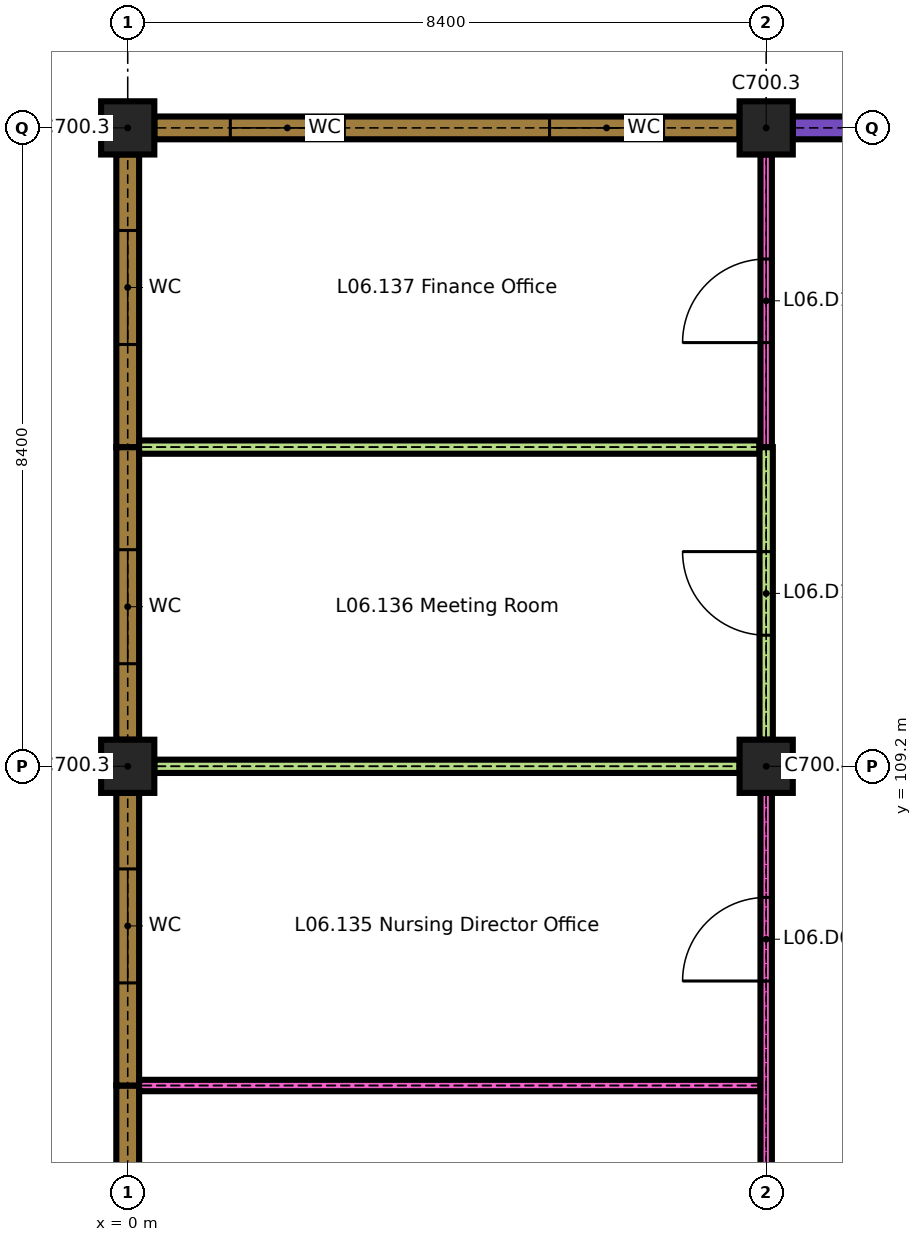
"""IFC4 building model, lengths in metres.
Left out: names, types, materials, properties, quantities, classifications, styles, units other than length and angle.
Written with IfcOpenShell. Run it as: python <this file> out.ifc"""

import sys

from ifc_helpers import new_model, si_unit, direction, frame, frame_2d, origin, origin_2d, place, context, subcontext, project, spatial, rectangle, extrude, element, fill, save


model = new_model("IFC4")
c1 = context("Model", 3, precision=1e-05, world=origin(), true_north=direction((0.0, 1.0)))
c2 = subcontext(c1, "Body", "Model", "MODEL_VIEW")
j1 = project(units=[si_unit("LENGTHUNIT", "METRE"), si_unit("PLANEANGLEUNIT", "RADIAN")], contexts=[c1])
p1 = place(None, origin())
s1 = spatial("IfcSite", under=j1, at=p1, CompositionType="ELEMENT")
p2 = place(p1, origin())
s2 = spatial("IfcBuilding", under=s1, at=p2, CompositionType="ELEMENT")
p3 = place(p2, frame((0.0, 0.0, 26.1)))
s3 = spatial("IfcBuildingStorey", under=s2, at=p3, CompositionType="ELEMENT", Elevation=26.1)
p4 = place(p3, frame((0.0, 109.2, 0.0), z_axis=(0.0, 0.0, 1.0), x_axis=(1.0, 0.0, 0.0)))
e1 = element("IfcColumn", 1, at=p4, inside=s3, PredefinedType="COLUMN", context=c2, shape_type="SweptSolid", body=[
    extrude(rectangle(XDim=0.7, YDim=0.7, at=origin_2d()), origin(), (0.0, 0.0, 1.0), 3.2),
])
p5 = place(p3, frame((8.4, 109.2, 0.0), z_axis=(0.0, 0.0, 1.0), x_axis=(1.0, 0.0, 0.0)))
e2 = element("IfcColumn", 2, at=p5, inside=s3, PredefinedType="COLUMN", context=c2, shape_type="SweptSolid", body=[
    extrude(rectangle(XDim=0.7, YDim=0.7, at=origin_2d()), origin(), (0.0, 0.0, 1.0), 3.3),
])
for number, where, z_axis, x_axis in (
    (3, (0.0, 117.6, 0.0), (0.0, 0.0, 1.0), (1.0, 0.0, 0.0)),
    (4, (8.4, 117.6, 0.0), (0.0, 0.0, 1.0), (1.0, 0.0, 0.0)),
):
    element("IfcColumn", number, at=place(p3, frame(where, z_axis=z_axis, x_axis=x_axis)), inside=s3, PredefinedType="COLUMN", context=c2, shape_type="SweptSolid", body=[
        extrude(rectangle(XDim=0.7, YDim=0.7, at=origin_2d()), origin(), (0.0, 0.0, 1.0), 3.2),
    ])
p6 = place(p3, frame((0.35, 117.6, 0.0), z_axis=(0.0, 0.0, 1.0), x_axis=(1.0, 0.0, 0.0)))
e5 = element("IfcWall", 5, at=p6, inside=s3, PredefinedType="SOLIDWALL", context=c2, shape_type="SweptSolid", body=[
    extrude(rectangle(XDim=7.7, YDim=0.3, at=frame_2d((3.85, 0.0))), origin(), (0.0, 0.0, 1.0), 2.9),
])
p7 = place(p6, frame((1.0, 0.0, 0.9)))
e6 = element("IfcOpeningElement", 6, at=p7, cuts=e5, PredefinedType="OPENING", context=c2, shape_type="SweptSolid", body=[
    extrude(rectangle(XDim=1.5, YDim=1.5, at=frame_2d((0.75, 0.75))), frame((0.0, 0.16, 0.0), z_axis=(0.0, -1.0, 0.0), x_axis=(1.0, 0.0, 0.0)), (0.0, 0.0, 1.0), 0.32),
])
p8 = place(p6, frame((5.2, 0.0, 0.9)))
e7 = element("IfcOpeningElement", 7, at=p8, cuts=e5, PredefinedType="OPENING", context=c2, shape_type="SweptSolid", body=[
    extrude(rectangle(XDim=1.5, YDim=1.5, at=frame_2d((0.75, 0.75))), frame((0.0, 0.16, 0.0), z_axis=(0.0, -1.0, 0.0), x_axis=(1.0, 0.0, 0.0)), (0.0, 0.0, 1.0), 0.32),
])
p9 = place(p3, frame((8.75, 117.6, 0.0), z_axis=(0.0, 0.0, 1.0), x_axis=(1.0, 0.0, 0.0)))
e8 = element("IfcWall", 8, at=p9, inside=s3, PredefinedType="SOLIDWALL", context=c2, shape_type="SweptSolid", body=[
    extrude(rectangle(XDim=2.65, YDim=0.3, at=frame_2d((1.325, 0.0))), origin(), (0.0, 0.0, 1.0), 3.3),
])
p10 = place(p9, frame((1.3, 0.0, 0.9)))
e9 = element("IfcOpeningElement", 9, at=p10, cuts=e8, PredefinedType="OPENING", context=c2, shape_type="SweptSolid", body=[
    extrude(rectangle(XDim=0.9, YDim=1.5, at=frame_2d((0.45, 0.75))), frame((0.0, 0.16, 0.0), z_axis=(0.0, -1.0, 0.0), x_axis=(1.0, 0.0, 0.0)), (0.0, 0.0, 1.0), 0.32),
])
p11 = place(p3, frame((0.0, 101.15, 0.0), z_axis=(0.0, 0.0, 1.0), x_axis=(0.0, 1.0, 0.0)))
e10 = element("IfcWall", 10, at=p11, inside=s3, PredefinedType="SOLIDWALL", context=c2, shape_type="SweptSolid", body=[
    extrude(rectangle(XDim=3.85, YDim=0.3, at=frame_2d((1.925, 0.0))), origin(), (0.0, 0.0, 1.0), 2.9),
])
p12 = place(p11, frame((1.0, 0.0, 0.9)))
e11 = element("IfcOpeningElement", 11, at=p12, cuts=e10, PredefinedType="OPENING", context=c2, shape_type="SweptSolid", body=[
    extrude(rectangle(XDim=1.5, YDim=1.5, at=frame_2d((0.75, 0.75))), frame((0.0, 0.16, 0.0), z_axis=(0.0, -1.0, 0.0), x_axis=(1.0, 0.0, 0.0)), (0.0, 0.0, 1.0), 0.32),
])
p13 = place(p3, frame((0.0, 105.0, 0.0), z_axis=(0.0, 0.0, 1.0), x_axis=(0.0, 1.0, 0.0)))
e12 = element("IfcWall", 12, at=p13, inside=s3, PredefinedType="SOLIDWALL", context=c2, shape_type="SweptSolid", body=[
    extrude(rectangle(XDim=3.85, YDim=0.3, at=frame_2d((1.925, 0.0))), origin(), (0.0, 0.0, 1.0), 2.9),
])
p14 = place(p13, frame((1.35, 0.0, 0.9)))
e13 = element("IfcOpeningElement", 13, at=p14, cuts=e12, PredefinedType="OPENING", context=c2, shape_type="SweptSolid", body=[
    extrude(rectangle(XDim=1.5, YDim=1.5, at=frame_2d((0.75, 0.75))), frame((0.0, 0.16, 0.0), z_axis=(0.0, -1.0, 0.0), x_axis=(1.0, 0.0, 0.0)), (0.0, 0.0, 1.0), 0.32),
])
p15 = place(p3, frame((0.0, 109.55, 0.0), z_axis=(0.0, 0.0, 1.0), x_axis=(0.0, 1.0, 0.0)))
e14 = element("IfcWall", 14, at=p15, inside=s3, PredefinedType="SOLIDWALL", context=c2, shape_type="SweptSolid", body=[
    extrude(rectangle(XDim=3.85, YDim=0.3, at=frame_2d((1.925, 0.0))), origin(), (0.0, 0.0, 1.0), 2.9),
])
p16 = place(p15, frame((1.0, 0.0, 0.9)))
e15 = element("IfcOpeningElement", 15, at=p16, cuts=e14, PredefinedType="OPENING", context=c2, shape_type="SweptSolid", body=[
    extrude(rectangle(XDim=1.5, YDim=1.5, at=frame_2d((0.75, 0.75))), frame((0.0, 0.16, 0.0), z_axis=(0.0, -1.0, 0.0), x_axis=(1.0, 0.0, 0.0)), (0.0, 0.0, 1.0), 0.32),
])
p17 = place(p3, frame((0.0, 113.4, 0.0), z_axis=(0.0, 0.0, 1.0), x_axis=(0.0, 1.0, 0.0)))
e16 = element("IfcWall", 16, at=p17, inside=s3, PredefinedType="SOLIDWALL", context=c2, shape_type="SweptSolid", body=[
    extrude(rectangle(XDim=3.85, YDim=0.3, at=frame_2d((1.925, 0.0))), origin(), (0.0, 0.0, 1.0), 2.9),
])
p18 = place(p17, frame((1.35, 0.0, 0.9)))
e17 = element("IfcOpeningElement", 17, at=p18, cuts=e16, PredefinedType="OPENING", context=c2, shape_type="SweptSolid", body=[
    extrude(rectangle(XDim=1.5, YDim=1.5, at=frame_2d((0.75, 0.75))), frame((0.0, 0.16, 0.0), z_axis=(0.0, -1.0, 0.0), x_axis=(1.0, 0.0, 0.0)), (0.0, 0.0, 1.0), 0.32),
])
p19 = place(p3, frame((0.15, 105.0, 0.0), z_axis=(0.0, 0.0, 1.0), x_axis=(1.0, 0.0, 0.0)))
e18 = element("IfcWall", 18, at=p19, inside=s3, PredefinedType="PARTITIONING", context=c2, shape_type="SweptSolid", body=[
    extrude(rectangle(XDim=8.175, YDim=0.15, at=frame_2d((4.087, 0.0))), origin(), (0.0, 0.0, 1.0), 3.3),
])
p20 = place(p3, frame((0.35, 109.2, 0.0), z_axis=(0.0, 0.0, 1.0), x_axis=(1.0, 0.0, 0.0)))
e19 = element("IfcWall", 19, at=p20, inside=s3, PredefinedType="PARTITIONING", context=c2, shape_type="SweptSolid", body=[
    extrude(rectangle(XDim=7.7, YDim=0.175, at=frame_2d((3.85, 0.0))), origin(), (0.0, 0.0, 1.0), 3.3),
])
p21 = place(p3, frame((0.15, 113.4, 0.0), z_axis=(0.0, 0.0, 1.0), x_axis=(1.0, 0.0, 0.0)))
e20 = element("IfcWall", 20, at=p21, inside=s3, PredefinedType="PARTITIONING", context=c2, shape_type="SweptSolid", body=[
    extrude(rectangle(XDim=8.163, YDim=0.175, at=frame_2d((4.081, 0.0))), origin(), (0.0, 0.0, 1.0), 3.3),
])
p22 = place(p3, frame((8.4, 101.15, 0.0), z_axis=(0.0, 0.0, 1.0), x_axis=(0.0, 1.0, 0.0)))
e21 = element("IfcWall", 21, at=p22, inside=s3, PredefinedType="PARTITIONING", context=c2, shape_type="SweptSolid", body=[
    extrude(rectangle(XDim=7.7, YDim=0.15, at=frame_2d((3.85, 0.0))), origin(), (0.0, 0.0, 1.0), 3.3),
])
p23 = place(p22, frame((1.375, 0.0, 0.0)))
e22 = element("IfcOpeningElement", 22, at=p23, cuts=e21, PredefinedType="OPENING", context=c2, shape_type="SweptSolid", body=[
    extrude(rectangle(XDim=1.1, YDim=2.1, at=frame_2d((0.55, 1.05))), frame((0.0, 0.085, 0.0), z_axis=(0.0, -1.0, 0.0), x_axis=(1.0, 0.0, 0.0)), (0.0, 0.0, 1.0), 0.17),
])
p24 = place(p22, frame((5.225, 0.0, 0.0)))
e23 = element("IfcOpeningElement", 23, at=p24, cuts=e21, PredefinedType="OPENING", context=c2, shape_type="SweptSolid", body=[
    extrude(rectangle(XDim=1.1, YDim=2.1, at=frame_2d((0.55, 1.05))), frame((0.0, 0.085, 0.0), z_axis=(0.0, -1.0, 0.0), x_axis=(1.0, 0.0, 0.0)), (0.0, 0.0, 1.0), 0.17),
])
p25 = place(p3, frame((8.4, 109.55, 0.0), z_axis=(0.0, 0.0, 1.0), x_axis=(0.0, 1.0, 0.0)))
e24 = element("IfcWall", 24, at=p25, inside=s3, PredefinedType="PARTITIONING", context=c2, shape_type="SweptSolid", body=[
    extrude(rectangle(XDim=3.85, YDim=0.175, at=frame_2d((1.925, 0.0))), origin(), (0.0, 0.0, 1.0), 3.3),
])
p26 = place(p25, frame((1.375, 0.0, 0.0)))
e25 = element("IfcOpeningElement", 25, at=p26, cuts=e24, PredefinedType="OPENING", context=c2, shape_type="SweptSolid", body=[
    extrude(rectangle(XDim=1.1, YDim=2.1, at=frame_2d((0.55, 1.05))), frame((0.0, 0.097, 0.0), z_axis=(0.0, -1.0, 0.0), x_axis=(1.0, 0.0, 0.0)), (0.0, 0.0, 1.0), 0.195),
])
p27 = place(p3, frame((8.4, 113.4, 0.0), z_axis=(0.0, 0.0, 1.0), x_axis=(0.0, 1.0, 0.0)))
e26 = element("IfcWall", 26, at=p27, inside=s3, PredefinedType="PARTITIONING", context=c2, shape_type="SweptSolid", body=[
    extrude(rectangle(XDim=3.85, YDim=0.15, at=frame_2d((1.925, 0.0))), origin(), (0.0, 0.0, 1.0), 3.3),
])
p28 = place(p27, frame((1.375, 0.0, 0.0)))
e27 = element("IfcOpeningElement", 27, at=p28, cuts=e26, PredefinedType="OPENING", context=c2, shape_type="SweptSolid", body=[
    extrude(rectangle(XDim=1.1, YDim=2.1, at=frame_2d((0.55, 1.05))), frame((0.0, 0.085, 0.0), z_axis=(0.0, -1.0, 0.0), x_axis=(1.0, 0.0, 0.0)), (0.0, 0.0, 1.0), 0.17),
])
p29 = place(p7, origin())
e28 = element("IfcWindow", 28, at=p29, inside=s3, PartitioningType="SINGLE_PANEL", PredefinedType="WINDOW", context=c2, shape_type="SweptSolid", body=[
    extrude(rectangle(XDim=1.5, YDim=1.5, at=frame_2d((0.75, 0.75))), frame((0.0, 0.03, 0.0), z_axis=(0.0, -1.0, 0.0), x_axis=(1.0, 0.0, 0.0)), (0.0, 0.0, 1.0), 0.06),
])
fill(e6, e28)
p30 = place(p8, origin())
e29 = element("IfcWindow", 29, at=p30, inside=s3, PartitioningType="SINGLE_PANEL", PredefinedType="WINDOW", context=c2, shape_type="SweptSolid", body=[
    extrude(rectangle(XDim=1.5, YDim=1.5, at=frame_2d((0.75, 0.75))), frame((0.0, 0.03, 0.0), z_axis=(0.0, -1.0, 0.0), x_axis=(1.0, 0.0, 0.0)), (0.0, 0.0, 1.0), 0.06),
])
fill(e7, e29)
p31 = place(p14, origin())
e30 = element("IfcWindow", 30, at=p31, inside=s3, PartitioningType="SINGLE_PANEL", PredefinedType="WINDOW", context=c2, shape_type="SweptSolid", body=[
    extrude(rectangle(XDim=1.5, YDim=1.5, at=frame_2d((0.75, 0.75))), frame((0.0, 0.03, 0.0), z_axis=(0.0, -1.0, 0.0), x_axis=(1.0, 0.0, 0.0)), (0.0, 0.0, 1.0), 0.06),
])
fill(e13, e30)
p32 = place(p16, origin())
e31 = element("IfcWindow", 31, at=p32, inside=s3, PartitioningType="SINGLE_PANEL", PredefinedType="WINDOW", context=c2, shape_type="SweptSolid", body=[
    extrude(rectangle(XDim=1.5, YDim=1.5, at=frame_2d((0.75, 0.75))), frame((0.0, 0.03, 0.0), z_axis=(0.0, -1.0, 0.0), x_axis=(1.0, 0.0, 0.0)), (0.0, 0.0, 1.0), 0.06),
])
fill(e15, e31)
p33 = place(p18, origin())
e32 = element("IfcWindow", 32, at=p33, inside=s3, PartitioningType="SINGLE_PANEL", PredefinedType="WINDOW", context=c2, shape_type="SweptSolid", body=[
    extrude(rectangle(XDim=1.5, YDim=1.5, at=frame_2d((0.75, 0.75))), frame((0.0, 0.03, 0.0), z_axis=(0.0, -1.0, 0.0), x_axis=(1.0, 0.0, 0.0)), (0.0, 0.0, 1.0), 0.06),
])
fill(e17, e32)
p34 = place(p24, origin())
e33 = element("IfcDoor", 33, at=p34, inside=s3, OperationType="SINGLE_SWING_RIGHT", PredefinedType="DOOR", context=c2, shape_type="SweptSolid", body=[
    extrude(rectangle(XDim=1.1, YDim=2.1, at=frame_2d((0.55, 1.05))), frame((0.0, 0.025, 0.0), z_axis=(0.0, -1.0, 0.0), x_axis=(1.0, 0.0, 0.0)), (0.0, 0.0, 1.0), 0.05),
])
fill(e23, e33)
p35 = place(p26, origin())
e34 = element("IfcDoor", 34, at=p35, inside=s3, OperationType="SINGLE_SWING_LEFT", PredefinedType="DOOR", context=c2, shape_type="SweptSolid", body=[
    extrude(rectangle(XDim=1.1, YDim=2.1, at=frame_2d((0.55, 1.05))), frame((0.0, 0.035, 0.0), z_axis=(0.0, -1.0, 0.0), x_axis=(1.0, 0.0, 0.0)), (0.0, 0.0, 1.0), 0.07),
])
fill(e25, e34)
p36 = place(p28, origin())
e35 = element("IfcDoor", 35, at=p36, inside=s3, OperationType="SINGLE_SWING_RIGHT", PredefinedType="DOOR", context=c2, shape_type="SweptSolid", body=[
    extrude(rectangle(XDim=1.1, YDim=2.1, at=frame_2d((0.55, 1.05))), frame((0.0, 0.025, 0.0), z_axis=(0.0, -1.0, 0.0), x_axis=(1.0, 0.0, 0.0)), (0.0, 0.0, 1.0), 0.05),
])
fill(e27, e35)
save(model, sys.argv[1])
